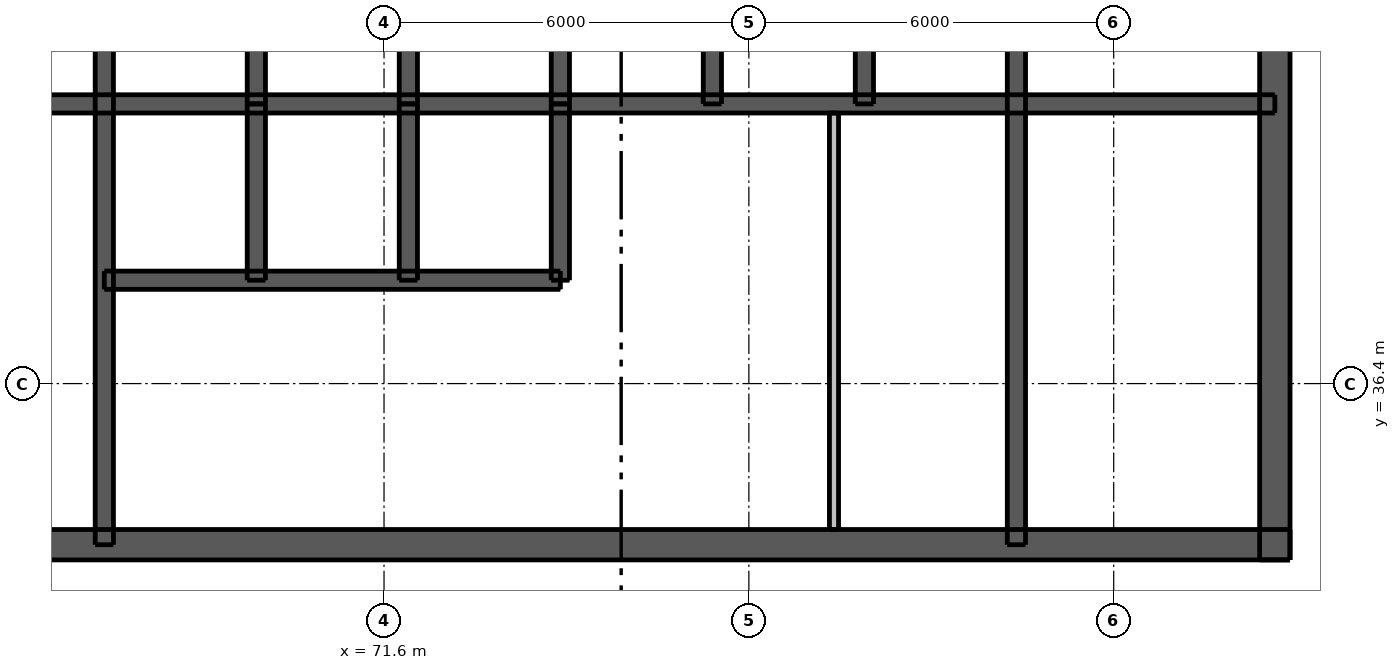
"""IFC4 building model, lengths in metres.
Left out: names, types, materials, properties, quantities, classifications, styles, units other than length and angle.
Written with IfcOpenShell. Run it as: python <this file> out.ifc"""

import sys

from ifc_helpers import new_model, si_unit, direction, frame, frame_2d, origin, place, context, subcontext, project, spatial, rectangle, extrude, element, fill, save


model = new_model("IFC4")
c1 = context("Model", 3, precision=1e-05, world=origin(), true_north=direction((0.0, 1.0)))
c2 = subcontext(c1, "Body", "Model", "MODEL_VIEW")
j1 = project(units=[si_unit("LENGTHUNIT", "METRE"), si_unit("PLANEANGLEUNIT", "RADIAN")], contexts=[c1])
p1 = place(None, origin())
s1 = spatial("IfcSite", under=j1, at=p1, CompositionType="ELEMENT")
p2 = place(p1, origin())
s2 = spatial("IfcBuilding", under=s1, at=p2, CompositionType="ELEMENT")
p3 = place(p2, frame((0.0, 0.0, 252.1)))
s3 = spatial("IfcBuildingStorey", under=s2, at=p3, CompositionType="ELEMENT", Elevation=252.1)
p4 = place(p3, frame((62.5, 33.75, 0.0), z_axis=(0.0, 0.0, 1.0), x_axis=(1.0, 0.0, 0.0)))
e1 = element("IfcWall", 1, at=p4, inside=s3, PredefinedType="SHEAR", context=c2, shape_type="SweptSolid", body=[
    extrude(rectangle(XDim=24.0, YDim=0.5, at=frame_2d((12.0, 0.0))), origin(), (0.0, 0.0, 1.0), 3.05),
])
p5 = place(p4, frame((1.875, 0.0, 0.0)))
e2 = element("IfcOpeningElement", 2, at=p5, cuts=e1, PredefinedType="OPENING", context=c2, shape_type="SweptSolid", body=[
    extrude(rectangle(XDim=1.1, YDim=2.1, at=frame_2d((0.55, 1.05))), frame((0.0, 0.26, 0.0), z_axis=(0.0, -1.0, 0.0), x_axis=(1.0, 0.0, 0.0)), (0.0, 0.0, 1.0), 0.52),
])
p6 = place(p4, frame((21.025, 0.0, 0.0)))
e3 = element("IfcOpeningElement", 3, at=p6, cuts=e1, PredefinedType="OPENING", context=c2, shape_type="SweptSolid", body=[
    extrude(rectangle(XDim=1.1, YDim=2.1, at=frame_2d((0.55, 1.05))), frame((0.0, 0.26, 0.0), z_axis=(0.0, -1.0, 0.0), x_axis=(1.0, 0.0, 0.0)), (0.0, 0.0, 1.0), 0.52),
])
p7 = place(p4, frame((8.0, 0.0, 0.0)))
e4 = element("IfcOpeningElement", 4, at=p7, cuts=e1, PredefinedType="OPENING", context=c2, shape_type="SweptSolid", body=[
    extrude(rectangle(XDim=1.1, YDim=2.1, at=frame_2d((0.55, 1.05))), frame((0.0, 0.26, 0.0), z_axis=(0.0, -1.0, 0.0), x_axis=(1.0, 0.0, 0.0)), (0.0, 0.0, 1.0), 0.52),
])
p8 = place(p4, frame((17.512, 0.0, 0.0)))
e5 = element("IfcOpeningElement", 5, at=p8, cuts=e1, PredefinedType="OPENING", context=c2, shape_type="SweptSolid", body=[
    extrude(rectangle(XDim=0.9, YDim=2.1, at=frame_2d((0.45, 1.05))), frame((0.0, 0.26, 0.0), z_axis=(0.0, -1.0, 0.0), x_axis=(1.0, 0.0, 0.0)), (0.0, 0.0, 1.0), 0.52),
])
p9 = place(p3, frame((86.25, 33.5, 0.0), z_axis=(0.0, 0.0, 1.0), x_axis=(0.0, 1.0, 0.0)))
e6 = element("IfcWall", 6, at=p9, inside=s3, PredefinedType="SHEAR", context=c2, shape_type="SweptSolid", body=[
    extrude(rectangle(XDim=24.0, YDim=0.5, at=frame_2d((12.0, 0.0))), origin(), (0.0, 0.0, 1.0), 3.05),
])
p10 = place(p9, frame((11.2, 0.0, 0.0)))
e7 = element("IfcOpeningElement", 7, at=p10, cuts=e6, PredefinedType="OPENING", context=c2, shape_type="SweptSolid", body=[
    extrude(rectangle(XDim=1.6, YDim=2.1, at=frame_2d((0.8, 1.05))), frame((0.0, 0.26, 0.0), z_axis=(0.0, -1.0, 0.0), x_axis=(1.0, 0.0, 0.0)), (0.0, 0.0, 1.0), 0.52),
])
p11 = place(p3, frame((62.75, 41.0, 0.0), z_axis=(0.0, 0.0, 1.0), x_axis=(1.0, 0.0, 0.0)))
e8 = element("IfcWall", 8, at=p11, inside=s3, PredefinedType="SHEAR", context=c2, shape_type="SweptSolid", body=[
    extrude(rectangle(XDim=23.5, YDim=0.3, at=frame_2d((11.75, 0.0))), origin(), (0.0, 0.0, 1.0), 3.05),
])
p12 = place(p3, frame((67.0, 33.75, 0.0), z_axis=(0.0, 0.0, 1.0), x_axis=(0.0, 1.0, 0.0)))
e9 = element("IfcWall", 9, at=p12, inside=s3, PredefinedType="SHEAR", context=c2, shape_type="SweptSolid", body=[
    extrude(rectangle(XDim=10.15, YDim=0.3, at=frame_2d((5.075, 0.0))), origin(), (0.0, 0.0, 1.0), 3.05),
])
p13 = place(p12, frame((0.45, 0.0, 0.0)))
e10 = element("IfcOpeningElement", 10, at=p13, cuts=e9, PredefinedType="OPENING", context=c2, shape_type="SweptSolid", body=[
    extrude(rectangle(XDim=1.1, YDim=2.1, at=frame_2d((0.55, 1.05))), frame((0.0, 0.16, 0.0), z_axis=(0.0, -1.0, 0.0), x_axis=(1.0, 0.0, 0.0)), (0.0, 0.0, 1.0), 0.32),
])
p14 = place(p3, frame((82.0, 33.75, 0.0), z_axis=(0.0, 0.0, 1.0), x_axis=(0.0, 1.0, 0.0)))
e11 = element("IfcWall", 11, at=p14, inside=s3, PredefinedType="SHEAR", context=c2, shape_type="SweptSolid", body=[
    extrude(rectangle(XDim=10.15, YDim=0.3, at=frame_2d((5.075, 0.0))), origin(), (0.0, 0.0, 1.0), 3.05),
])
for number, where, z_axis, x_axis in (
    (12, (69.5, 41.0, 0.0), (0.0, 0.0, 1.0), (0.0, 1.0, 0.0)),
    (13, (72.0, 41.0, 0.0), (0.0, 0.0, 1.0), (0.0, 1.0, 0.0)),
    (14, (74.5, 41.0, 0.0), (0.0, 0.0, 1.0), (0.0, 1.0, 0.0)),
    (15, (77.0, 41.0, 0.0), (0.0, 0.0, 1.0), (0.0, 1.0, 0.0)),
    (16, (79.5, 41.0, 0.0), (0.0, 0.0, 1.0), (0.0, 1.0, 0.0)),
):
    element("IfcWall", number, at=place(p3, frame(where, z_axis=z_axis, x_axis=x_axis)), inside=s3, PredefinedType="SHEAR", context=c2, shape_type="SweptSolid", body=[
        extrude(rectangle(XDim=2.9, YDim=0.3, at=frame_2d((1.45, 0.0))), origin(), (0.0, 0.0, 1.0), 3.05),
    ])
p15 = place(p3, frame((67.0, 38.1, 0.0), z_axis=(0.0, 0.0, 1.0), x_axis=(1.0, 0.0, 0.0)))
e17 = element("IfcWall", 17, at=p15, inside=s3, PredefinedType="SHEAR", context=c2, shape_type="SweptSolid", body=[
    extrude(rectangle(XDim=7.5, YDim=0.3, at=frame_2d((3.75, 0.0))), origin(), (0.0, 0.0, 1.0), 3.05),
])
p16 = place(p15, frame((0.7, 0.0, 0.0)))
e18 = element("IfcOpeningElement", 18, at=p16, cuts=e17, PredefinedType="OPENING", context=c2, shape_type="SweptSolid", body=[
    extrude(rectangle(XDim=1.1, YDim=2.1, at=frame_2d((0.55, 1.05))), frame((0.0, 0.16, 0.0), z_axis=(0.0, -1.0, 0.0), x_axis=(1.0, 0.0, 0.0)), (0.0, 0.0, 1.0), 0.32),
])
p17 = place(p15, frame((3.2, 0.0, 0.0)))
e19 = element("IfcOpeningElement", 19, at=p17, cuts=e17, PredefinedType="OPENING", context=c2, shape_type="SweptSolid", body=[
    extrude(rectangle(XDim=1.1, YDim=2.1, at=frame_2d((0.55, 1.05))), frame((0.0, 0.16, 0.0), z_axis=(0.0, -1.0, 0.0), x_axis=(1.0, 0.0, 0.0)), (0.0, 0.0, 1.0), 0.32),
])
p18 = place(p15, frame((5.65, 0.0, 0.0)))
e20 = element("IfcOpeningElement", 20, at=p18, cuts=e17, PredefinedType="OPENING", context=c2, shape_type="SweptSolid", body=[
    extrude(rectangle(XDim=1.2, YDim=2.1, at=frame_2d((0.6, 1.05))), frame((0.0, 0.16, 0.0), z_axis=(0.0, -1.0, 0.0), x_axis=(1.0, 0.0, 0.0)), (0.0, 0.0, 1.0), 0.32),
])
for number, where, z_axis, x_axis in (
    (21, (69.5, 38.1, 0.0), (0.0, 0.0, 1.0), (0.0, 1.0, 0.0)),
    (22, (72.0, 38.1, 0.0), (0.0, 0.0, 1.0), (0.0, 1.0, 0.0)),
    (23, (74.5, 38.1, 0.0), (0.0, 0.0, 1.0), (0.0, 1.0, 0.0)),
):
    element("IfcWall", number, at=place(p3, frame(where, z_axis=z_axis, x_axis=x_axis)), inside=s3, PredefinedType="SHEAR", context=c2, shape_type="SweptSolid", body=[
        extrude(rectangle(XDim=2.9, YDim=0.3, at=frame_2d((1.45, 0.0))), origin(), (0.0, 0.0, 1.0), 3.05),
    ])
p19 = place(p3, frame((79.0, 34.0, 0.0), z_axis=(0.0, 0.0, 1.0), x_axis=(0.0, 1.0, 0.0)))
e24 = element("IfcWall", 24, at=p19, inside=s3, PredefinedType="PLUMBINGWALL", context=c2, shape_type="SweptSolid", body=[
    extrude(rectangle(XDim=6.85, YDim=0.15, at=frame_2d((3.425, 0.0))), origin(), (0.0, 0.0, 1.0), 3.05),
])
p20 = place(p6, origin())
e25 = element("IfcDoor", 25, at=p20, inside=s3, OperationType="SINGLE_SWING_RIGHT", PredefinedType="DOOR", context=c2, shape_type="SweptSolid", body=[
    extrude(rectangle(XDim=1.1, YDim=2.1, at=frame_2d((0.55, 1.05))), frame((0.0, 0.237, 0.0), z_axis=(0.0, -1.0, 0.0), x_axis=(1.0, 0.0, 0.0)), (0.0, 0.0, 1.0), 0.05),
])
fill(e3, e25)
p21 = place(p7, origin())
e26 = element("IfcDoor", 26, at=p21, inside=s3, OperationType="SINGLE_SWING_LEFT", PredefinedType="DOOR", context=c2, shape_type="SweptSolid", body=[
    extrude(rectangle(XDim=1.1, YDim=2.1, at=frame_2d((0.55, 1.05))), frame((0.0, 0.237, 0.0), z_axis=(0.0, -1.0, 0.0), x_axis=(1.0, 0.0, 0.0)), (0.0, 0.0, 1.0), 0.05),
])
fill(e4, e26)
p22 = place(p13, origin())
e27 = element("IfcDoor", 27, at=p22, inside=s3, OperationType="SINGLE_SWING_RIGHT", PredefinedType="DOOR", context=c2, shape_type="SweptSolid", body=[
    extrude(rectangle(XDim=1.1, YDim=2.1, at=frame_2d((0.55, 1.05))), frame((0.0, -0.087, 0.0), z_axis=(0.0, -1.0, 0.0), x_axis=(1.0, 0.0, 0.0)), (0.0, 0.0, 1.0), 0.05),
])
fill(e10, e27)
p23 = place(p8, origin())
e28 = element("IfcDoor", 28, at=p23, inside=s3, OperationType="SINGLE_SWING_LEFT", PredefinedType="DOOR", context=c2, shape_type="SweptSolid", body=[
    extrude(rectangle(XDim=0.9, YDim=2.1, at=frame_2d((0.45, 1.05))), frame((0.0, 0.237, 0.0), z_axis=(0.0, -1.0, 0.0), x_axis=(1.0, 0.0, 0.0)), (0.0, 0.0, 1.0), 0.05),
])
fill(e5, e28)
p24 = place(p16, origin())
e29 = element("IfcDoor", 29, at=p24, inside=s3, OperationType="DOUBLE_DOOR_SLIDING", PredefinedType="DOOR", context=c2, shape_type="SweptSolid", body=[
    extrude(rectangle(XDim=1.1, YDim=2.1, at=frame_2d((0.55, 1.05))), frame((0.0, 0.025, 0.0), z_axis=(0.0, -1.0, 0.0), x_axis=(1.0, 0.0, 0.0)), (0.0, 0.0, 1.0), 0.05),
])
fill(e18, e29)
p25 = place(p17, origin())
e30 = element("IfcDoor", 30, at=p25, inside=s3, OperationType="DOUBLE_DOOR_SLIDING", PredefinedType="DOOR", context=c2, shape_type="SweptSolid", body=[
    extrude(rectangle(XDim=1.1, YDim=2.1, at=frame_2d((0.55, 1.05))), frame((0.0, 0.025, 0.0), z_axis=(0.0, -1.0, 0.0), x_axis=(1.0, 0.0, 0.0)), (0.0, 0.0, 1.0), 0.05),
])
fill(e19, e30)
p26 = place(p18, origin())
e31 = element("IfcDoor", 31, at=p26, inside=s3, OperationType="DOUBLE_DOOR_SLIDING", PredefinedType="DOOR", context=c2, shape_type="SweptSolid", body=[
    extrude(rectangle(XDim=1.2, YDim=2.1, at=frame_2d((0.6, 1.05))), frame((0.0, 0.025, 0.0), z_axis=(0.0, -1.0, 0.0), x_axis=(1.0, 0.0, 0.0)), (0.0, 0.0, 1.0), 0.05),
])
fill(e20, e31)
save(model, sys.argv[1])
